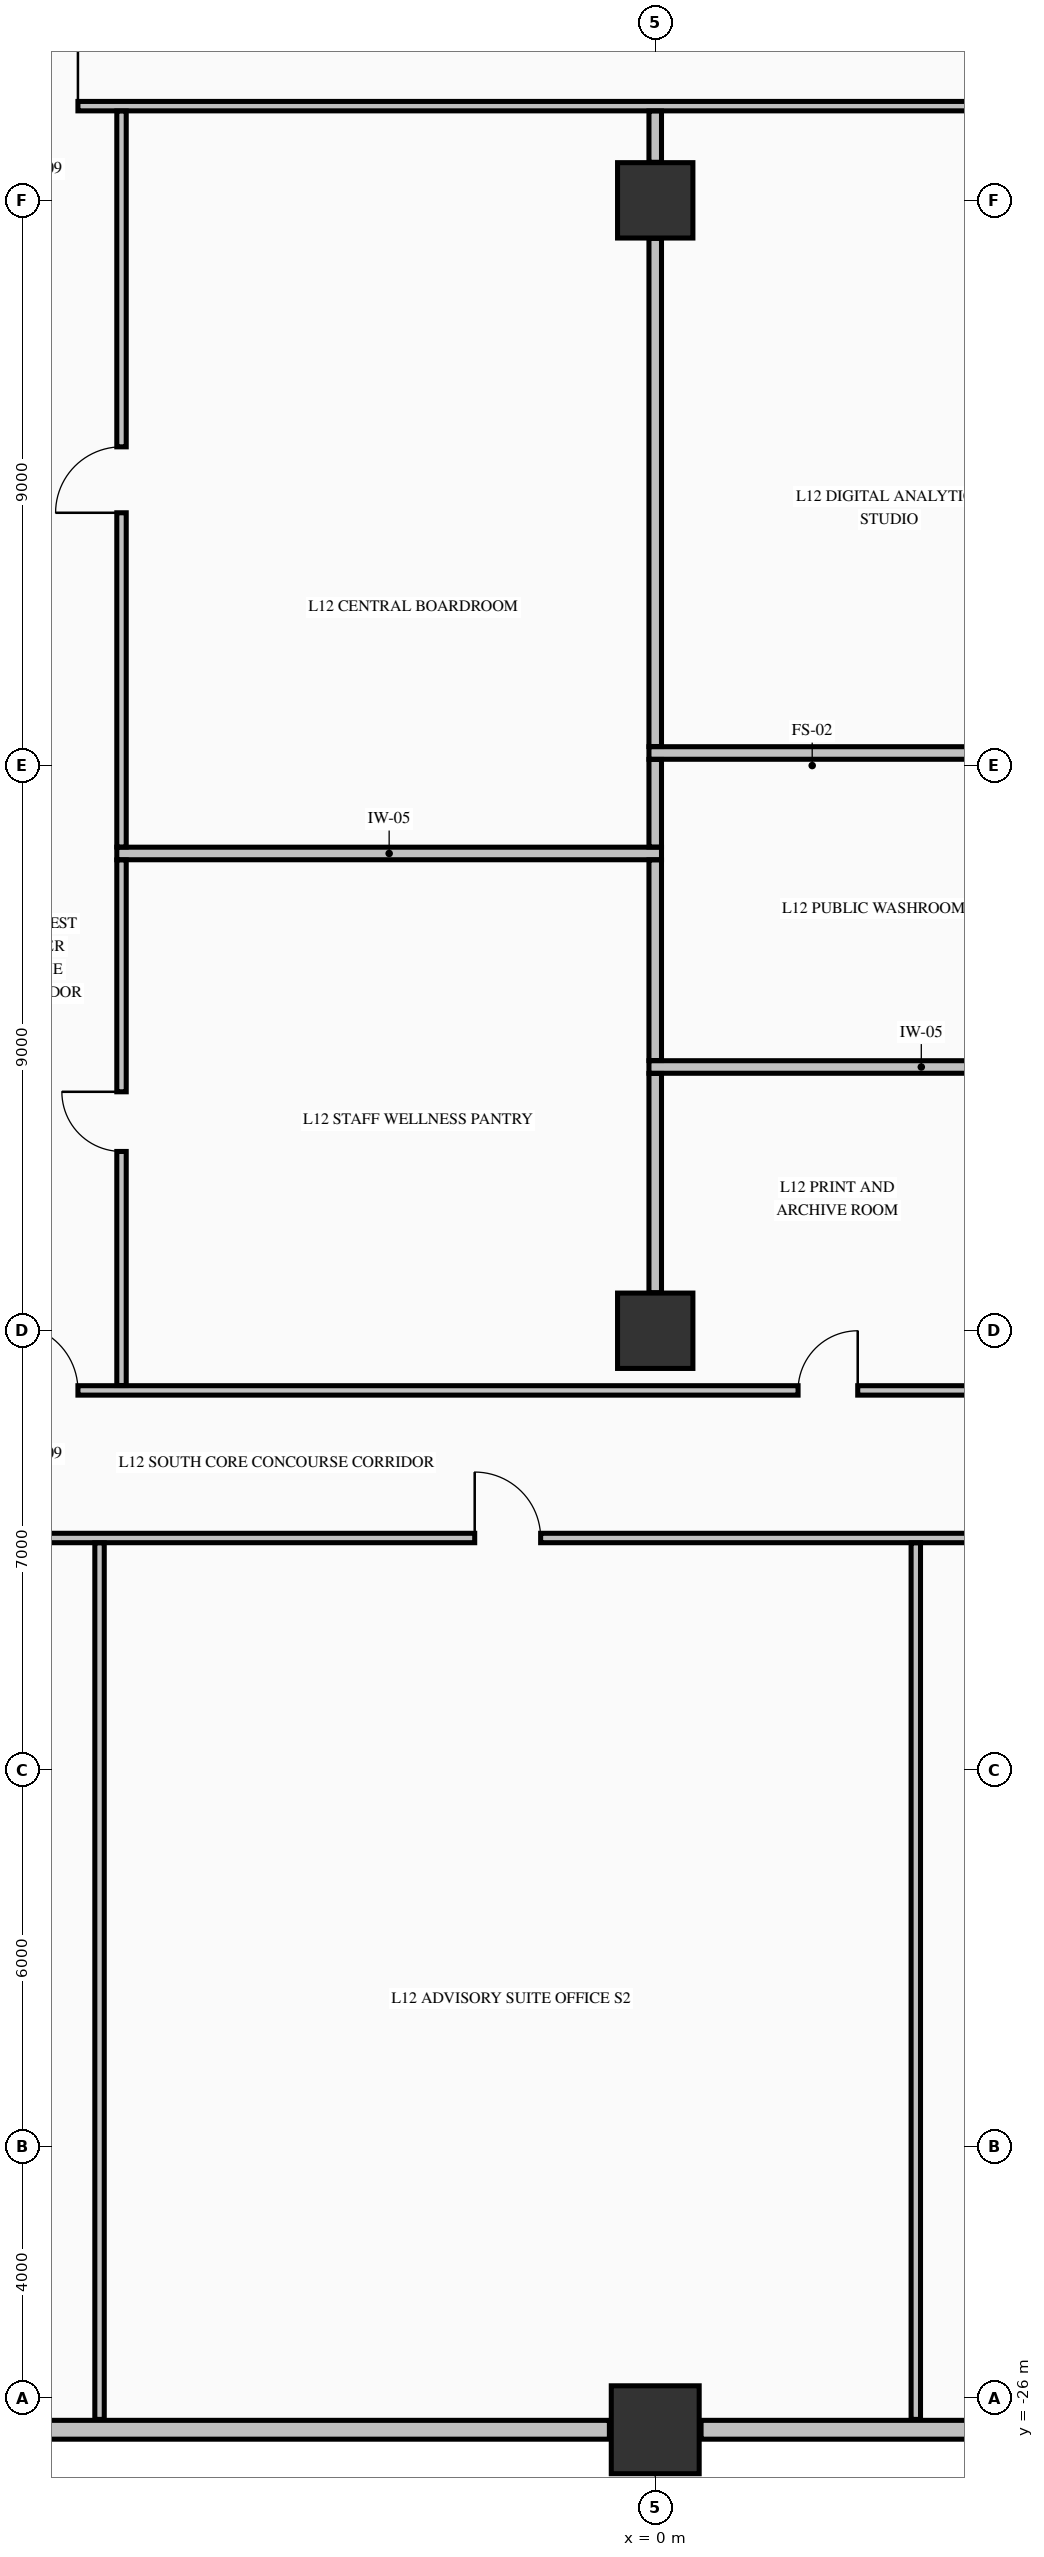
"""IFC4 building model, lengths in metres.
Left out: names, types, materials, properties, quantities, classifications, styles, units other than length and angle.
Written with IfcOpenShell. Run it as: python <this file> out.ifc"""

import sys

from ifc_helpers import new_model, si_unit, direction, frame, frame_2d, origin, origin_2d, place, context, subcontext, project, spatial, rectangle, extrude, element, fill, save


model = new_model("IFC4")
c1 = context("Model", 3, precision=1e-05, world=origin(), true_north=direction((0.0, 1.0)))
c2 = subcontext(c1, "Body", "Model", "MODEL_VIEW")
j1 = project(units=[si_unit("LENGTHUNIT", "METRE"), si_unit("PLANEANGLEUNIT", "RADIAN")], contexts=[c1])
p1 = place(None, origin())
s1 = spatial("IfcSite", under=j1, at=p1, CompositionType="ELEMENT")
p2 = place(p1, origin())
s2 = spatial("IfcBuilding", under=s1, at=p2, CompositionType="ELEMENT")
p3 = place(p2, frame((0.0, 0.0, 52.19)))
s3 = spatial("IfcBuildingStorey", under=s2, at=p3, CompositionType="ELEMENT", Elevation=52.19)
p4 = place(p3, frame((0.0, -26.5, -0.425), z_axis=(0.0, 0.0, 1.0), x_axis=(1.0, 0.0, 0.0)))
e1 = element("IfcColumn", 1, at=p4, inside=s3, PredefinedType="COLUMN", context=c2, shape_type="SweptSolid", body=[
    extrude(rectangle(XDim=1.4, YDim=1.4, at=origin_2d()), origin(), (0.0, 0.0, 1.0), 5.0),
])
for number, where, z_axis, x_axis in (
    (2, (0.0, -9.0, -0.425), (0.0, 0.0, 1.0), (1.0, 0.0, 0.0)),
    (3, (0.0, 9.0, -0.425), (0.0, 0.0, 1.0), (1.0, 0.0, 0.0)),
):
    element("IfcColumn", number, at=place(p3, frame(where, z_axis=z_axis, x_axis=x_axis)), inside=s3, PredefinedType="COLUMN", context=c2, shape_type="SweptSolid", body=[
        extrude(rectangle(XDim=1.2, YDim=1.2, at=origin_2d()), origin(), (0.0, 0.0, 1.0), 5.0),
    ])
for number, where, z_axis, x_axis in (
    (4, (-10.27, -26.5, 0.0), (0.0, 0.0, 1.0), (1.0, 0.0, 0.0)),
    (5, (0.73, -26.5, 0.0), (0.0, 0.0, 1.0), (1.0, 0.0, 0.0)),
):
    element("IfcWall", number, at=place(p3, frame(where, z_axis=z_axis, x_axis=x_axis)), inside=s3, PredefinedType="STANDARD", context=c2, shape_type="SweptSolid", body=[
        extrude(rectangle(XDim=9.54, YDim=0.3, at=frame_2d((4.77, 0.0))), origin(), (0.0, 0.0, 1.0), 2.167),
    ])
p5 = place(p3, frame((-23.835, -12.3, 0.0), z_axis=(0.0, 0.0, 1.0), x_axis=(1.0, 0.0, 0.0)))
e6 = element("IfcWall", 6, at=p5, inside=s3, PredefinedType="PARTITIONING", context=c2, shape_type="SweptSolid", body=[
    extrude(rectangle(XDim=52.67, YDim=0.15, at=frame_2d((26.335, 0.0))), origin(), (0.0, 0.0, 1.0), 4.575),
])
p6 = place(p5, frame((8.99, 0.0, 0.0)))
e7 = element("IfcOpeningElement", 7, at=p6, cuts=e6, PredefinedType="OPENING", context=c2, shape_type="SweptSolid", body=[
    extrude(rectangle(XDim=1.05, YDim=2.15, at=frame_2d((0.525, 1.075))), frame((0.0, 0.085, 0.0), z_axis=(0.0, -1.0, 0.0), x_axis=(1.0, 0.0, 0.0)), (0.0, 0.0, 1.0), 0.17),
])
p7 = place(p5, frame((20.96, 0.0, 0.0)))
e8 = element("IfcOpeningElement", 8, at=p7, cuts=e6, PredefinedType="OPENING", context=c2, shape_type="SweptSolid", body=[
    extrude(rectangle(XDim=1.05, YDim=2.15, at=frame_2d((0.525, 1.075))), frame((0.0, 0.085, 0.0), z_axis=(0.0, -1.0, 0.0), x_axis=(1.0, 0.0, 0.0)), (0.0, 0.0, 1.0), 0.17),
])
p8 = place(p5, frame((29.11, 0.0, 0.0)))
e9 = element("IfcOpeningElement", 9, at=p8, cuts=e6, PredefinedType="OPENING", context=c2, shape_type="SweptSolid", body=[
    extrude(rectangle(XDim=1.05, YDim=2.15, at=frame_2d((0.525, 1.075))), frame((0.0, 0.085, 0.0), z_axis=(0.0, -1.0, 0.0), x_axis=(1.0, 0.0, 0.0)), (0.0, 0.0, 1.0), 0.17),
])
p9 = place(p3, frame((-10.394, -9.95, 0.0), z_axis=(0.0, 0.0, 1.0), x_axis=(1.0, 0.0, 0.0)))
e10 = element("IfcWall", 10, at=p9, inside=s3, PredefinedType="PARTITIONING", context=c2, shape_type="SweptSolid", body=[
    extrude(rectangle(XDim=20.788, YDim=0.15, at=frame_2d((10.394, 0.0))), origin(), (0.0, 0.0, 1.0), 4.575),
])
p10 = place(p9, frame((0.15, 0.0, 0.0)))
e11 = element("IfcOpeningElement", 11, at=p10, cuts=e10, PredefinedType="OPENING", context=c2, shape_type="SweptSolid", body=[
    extrude(rectangle(XDim=1.05, YDim=2.15, at=frame_2d((0.525, 1.075))), frame((0.0, 0.085, 0.0), z_axis=(0.0, -1.0, 0.0), x_axis=(1.0, 0.0, 0.0)), (0.0, 0.0, 1.0), 0.17),
])
p11 = place(p9, frame((19.588, 0.0, 0.0)))
e12 = element("IfcOpeningElement", 12, at=p11, cuts=e10, PredefinedType="OPENING", context=c2, shape_type="SweptSolid", body=[
    extrude(rectangle(XDim=1.05, YDim=2.15, at=frame_2d((0.525, 1.075))), frame((0.0, 0.085, 0.0), z_axis=(0.0, -1.0, 0.0), x_axis=(1.0, 0.0, 0.0)), (0.0, 0.0, 1.0), 0.17),
])
p12 = place(p9, frame((12.669, 0.0, 0.0)))
e13 = element("IfcOpeningElement", 13, at=p12, cuts=e10, PredefinedType="OPENING", context=c2, shape_type="SweptSolid", body=[
    extrude(rectangle(XDim=0.95, YDim=2.15, at=frame_2d((0.475, 1.075))), frame((0.0, 0.085, 0.0), z_axis=(0.0, -1.0, 0.0), x_axis=(1.0, 0.0, 0.0)), (0.0, 0.0, 1.0), 0.17),
])
for number, where, z_axis, x_axis in (
    (14, (-0.1, -4.8, 0.0), (0.0, 0.0, 1.0), (1.0, 0.0, 0.0)),
    (15, (-8.575, -1.4, 0.0), (0.0, 0.0, 1.0), (1.0, 0.0, 0.0)),
    (16, (-0.1, 0.2, 0.0), (0.0, 0.0, 1.0), (1.0, 0.0, 0.0)),
):
    element("IfcWall", number, at=place(p3, frame(where, z_axis=z_axis, x_axis=x_axis)), inside=s3, PredefinedType="PARTITIONING", context=c2, shape_type="SweptSolid", body=[
        extrude(rectangle(XDim=8.675, YDim=0.2, at=frame_2d((4.337, 0.0))), origin(), (0.0, 0.0, 1.0), 4.575),
    ])
p13 = place(p3, frame((-10.394, 10.5, 0.0), z_axis=(0.0, 0.0, 1.0), x_axis=(1.0, 0.0, 0.0)))
e17 = element("IfcWall", 17, at=p13, inside=s3, PredefinedType="PARTITIONING", context=c2, shape_type="SweptSolid", body=[
    extrude(rectangle(XDim=20.788, YDim=0.15, at=frame_2d((10.394, 0.0))), origin(), (0.0, 0.0, 1.0), 4.575),
])
p14 = place(p13, frame((0.15, 0.0, 0.0)))
e18 = element("IfcOpeningElement", 18, at=p14, cuts=e17, PredefinedType="OPENING", context=c2, shape_type="SweptSolid", body=[
    extrude(rectangle(XDim=1.05, YDim=2.15, at=frame_2d((0.525, 1.075))), frame((0.0, 0.085, 0.0), z_axis=(0.0, -1.0, 0.0), x_axis=(1.0, 0.0, 0.0)), (0.0, 0.0, 1.0), 0.17),
])
p15 = place(p13, frame((19.588, 0.0, 0.0)))
e19 = element("IfcOpeningElement", 19, at=p15, cuts=e17, PredefinedType="OPENING", context=c2, shape_type="SweptSolid", body=[
    extrude(rectangle(XDim=1.05, YDim=2.15, at=frame_2d((0.525, 1.075))), frame((0.0, 0.085, 0.0), z_axis=(0.0, -1.0, 0.0), x_axis=(1.0, 0.0, 0.0)), (0.0, 0.0, 1.0), 0.17),
])
p16 = place(p3, frame((-8.85, -26.335, 0.0), z_axis=(0.0, 0.0, 1.0), x_axis=(0.0, 1.0, 0.0)))
e20 = element("IfcWall", 20, at=p16, inside=s3, PredefinedType="PARTITIONING", context=c2, shape_type="SweptSolid", body=[
    extrude(rectangle(XDim=13.957, YDim=0.15, at=frame_2d((6.979, 0.0))), origin(), (0.0, 0.0, 1.0), 4.575),
])
p17 = place(p3, frame((-8.5, -9.872, 0.0), z_axis=(0.0, 0.0, 1.0), x_axis=(0.0, 1.0, 0.0)))
e21 = element("IfcWall", 21, at=p17, inside=s3, PredefinedType="PARTITIONING", context=c2, shape_type="SweptSolid", body=[
    extrude(rectangle(XDim=8.369, YDim=0.15, at=frame_2d((4.185, 0.0))), origin(), (0.0, 0.0, 1.0), 4.575),
])
p18 = place(p17, frame((3.727, 0.0, 0.0)))
e22 = element("IfcOpeningElement", 22, at=p18, cuts=e21, PredefinedType="OPENING", context=c2, shape_type="SweptSolid", body=[
    extrude(rectangle(XDim=0.95, YDim=2.15, at=frame_2d((0.475, 1.075))), frame((0.0, 0.085, 0.0), z_axis=(0.0, -1.0, 0.0), x_axis=(1.0, 0.0, 0.0)), (0.0, 0.0, 1.0), 0.17),
])
p19 = place(p3, frame((-8.5, -1.297, 0.0), z_axis=(0.0, 0.0, 1.0), x_axis=(0.0, 1.0, 0.0)))
e23 = element("IfcWall", 23, at=p19, inside=s3, PredefinedType="PARTITIONING", context=c2, shape_type="SweptSolid", body=[
    extrude(rectangle(XDim=11.719, YDim=0.15, at=frame_2d((5.86, 0.0))), origin(), (0.0, 0.0, 1.0), 4.575),
])
p20 = place(p19, frame((5.322, 0.0, 0.0)))
e24 = element("IfcOpeningElement", 24, at=p20, cuts=e23, PredefinedType="OPENING", context=c2, shape_type="SweptSolid", body=[
    extrude(rectangle(XDim=1.05, YDim=2.15, at=frame_2d((0.525, 1.075))), frame((0.0, 0.085, 0.0), z_axis=(0.0, -1.0, 0.0), x_axis=(1.0, 0.0, 0.0)), (0.0, 0.0, 1.0), 0.17),
])
p21 = place(p3, frame((0.0, -8.394, 0.0), z_axis=(0.0, 0.0, 1.0), x_axis=(0.0, 1.0, 0.0)))
e25 = element("IfcWall", 25, at=p21, inside=s3, PredefinedType="PARTITIONING", context=c2, shape_type="SweptSolid", body=[
    extrude(rectangle(XDim=3.491, YDim=0.2, at=frame_2d((1.746, 0.0))), origin(), (0.0, 0.0, 1.0), 3.915),
])
p22 = place(p3, frame((0.0, -4.697, 0.0), z_axis=(0.0, 0.0, 1.0), x_axis=(0.0, 1.0, 0.0)))
e26 = element("IfcWall", 26, at=p22, inside=s3, PredefinedType="PARTITIONING", context=c2, shape_type="SweptSolid", body=[
    extrude(rectangle(XDim=3.194, YDim=0.2, at=frame_2d((1.597, 0.0))), origin(), (0.0, 0.0, 1.0), 3.915),
])
p23 = place(p3, frame((0.0, -1.297, 0.0), z_axis=(0.0, 0.0, 1.0), x_axis=(0.0, 1.0, 0.0)))
e27 = element("IfcWall", 27, at=p23, inside=s3, PredefinedType="PARTITIONING", context=c2, shape_type="SweptSolid", body=[
    extrude(rectangle(XDim=1.394, YDim=0.2, at=frame_2d((0.697, 0.0))), origin(), (0.0, 0.0, 1.0), 3.915),
])
p24 = place(p3, frame((0.0, 0.303, 0.0), z_axis=(0.0, 0.0, 1.0), x_axis=(0.0, 1.0, 0.0)))
e28 = element("IfcWall", 28, at=p24, inside=s3, PredefinedType="PARTITIONING", context=c2, shape_type="SweptSolid", body=[
    extrude(rectangle(XDim=8.091, YDim=0.2, at=frame_2d((4.045, 0.0))), origin(), (0.0, 0.0, 1.0), 3.915),
])
p25 = place(p3, frame((0.0, 9.606, 0.0), z_axis=(0.0, 0.0, 1.0), x_axis=(0.0, 1.0, 0.0)))
e29 = element("IfcWall", 29, at=p25, inside=s3, PredefinedType="PARTITIONING", context=c2, shape_type="SweptSolid", body=[
    extrude(rectangle(XDim=0.816, YDim=0.2, at=frame_2d((0.408, 0.0))), origin(), (0.0, 0.0, 1.0), 2.167),
])
p26 = place(p3, frame((4.15, -26.335, 0.0), z_axis=(0.0, 0.0, 1.0), x_axis=(0.0, 1.0, 0.0)))
e30 = element("IfcWall", 30, at=p26, inside=s3, PredefinedType="PARTITIONING", context=c2, shape_type="SweptSolid", body=[
    extrude(rectangle(XDim=13.957, YDim=0.15, at=frame_2d((6.979, 0.0))), origin(), (0.0, 0.0, 1.0), 4.575),
])
p27 = place(p14, origin())
e31 = element("IfcDoor", 31, at=p27, inside=s3, OperationType="SINGLE_SWING_RIGHT", PredefinedType="DOOR", context=c2, shape_type="SweptSolid", body=[
    extrude(rectangle(XDim=1.05, YDim=2.15, at=frame_2d((0.525, 1.075))), frame((0.0, 0.025, 0.0), z_axis=(0.0, -1.0, 0.0), x_axis=(1.0, 0.0, 0.0)), (0.0, 0.0, 1.0), 0.05),
])
fill(e18, e31)
p28 = place(p10, origin())
e32 = element("IfcDoor", 32, at=p28, inside=s3, OperationType="SINGLE_SWING_LEFT", PredefinedType="DOOR", context=c2, shape_type="SweptSolid", body=[
    extrude(rectangle(XDim=1.05, YDim=2.15, at=frame_2d((0.525, 1.075))), frame((0.0, 0.025, 0.0), z_axis=(0.0, -1.0, 0.0), x_axis=(1.0, 0.0, 0.0)), (0.0, 0.0, 1.0), 0.05),
])
fill(e11, e32)
p29 = place(p7, origin())
e33 = element("IfcDoor", 33, at=p29, inside=s3, OperationType="SINGLE_SWING_LEFT", PredefinedType="DOOR", context=c2, shape_type="SweptSolid", body=[
    extrude(rectangle(XDim=1.05, YDim=2.15, at=frame_2d((0.525, 1.075))), frame((0.0, 0.025, 0.0), z_axis=(0.0, -1.0, 0.0), x_axis=(1.0, 0.0, 0.0)), (0.0, 0.0, 1.0), 0.05),
])
fill(e8, e33)
p30 = place(p20, origin())
e34 = element("IfcDoor", 34, at=p30, inside=s3, OperationType="SINGLE_SWING_LEFT", PredefinedType="DOOR", context=c2, shape_type="SweptSolid", body=[
    extrude(rectangle(XDim=1.05, YDim=2.15, at=frame_2d((0.525, 1.075))), frame((0.0, 0.025, 0.0), z_axis=(0.0, -1.0, 0.0), x_axis=(1.0, 0.0, 0.0)), (0.0, 0.0, 1.0), 0.05),
])
fill(e24, e34)
p31 = place(p18, origin())
e35 = element("IfcDoor", 35, at=p31, inside=s3, OperationType="SINGLE_SWING_RIGHT", PredefinedType="DOOR", context=c2, shape_type="SweptSolid", body=[
    extrude(rectangle(XDim=0.95, YDim=2.15, at=frame_2d((0.475, 1.075))), frame((0.0, 0.025, 0.0), z_axis=(0.0, -1.0, 0.0), x_axis=(1.0, 0.0, 0.0)), (0.0, 0.0, 1.0), 0.05),
])
fill(e22, e35)
p32 = place(p12, origin())
e36 = element("IfcDoor", 36, at=p32, inside=s3, OperationType="SINGLE_SWING_RIGHT", PredefinedType="DOOR", context=c2, shape_type="SweptSolid", body=[
    extrude(rectangle(XDim=0.95, YDim=2.15, at=frame_2d((0.475, 1.075))), frame((0.0, 0.025, 0.0), z_axis=(0.0, -1.0, 0.0), x_axis=(1.0, 0.0, 0.0)), (0.0, 0.0, 1.0), 0.05),
])
fill(e13, e36)
save(model, sys.argv[1])
